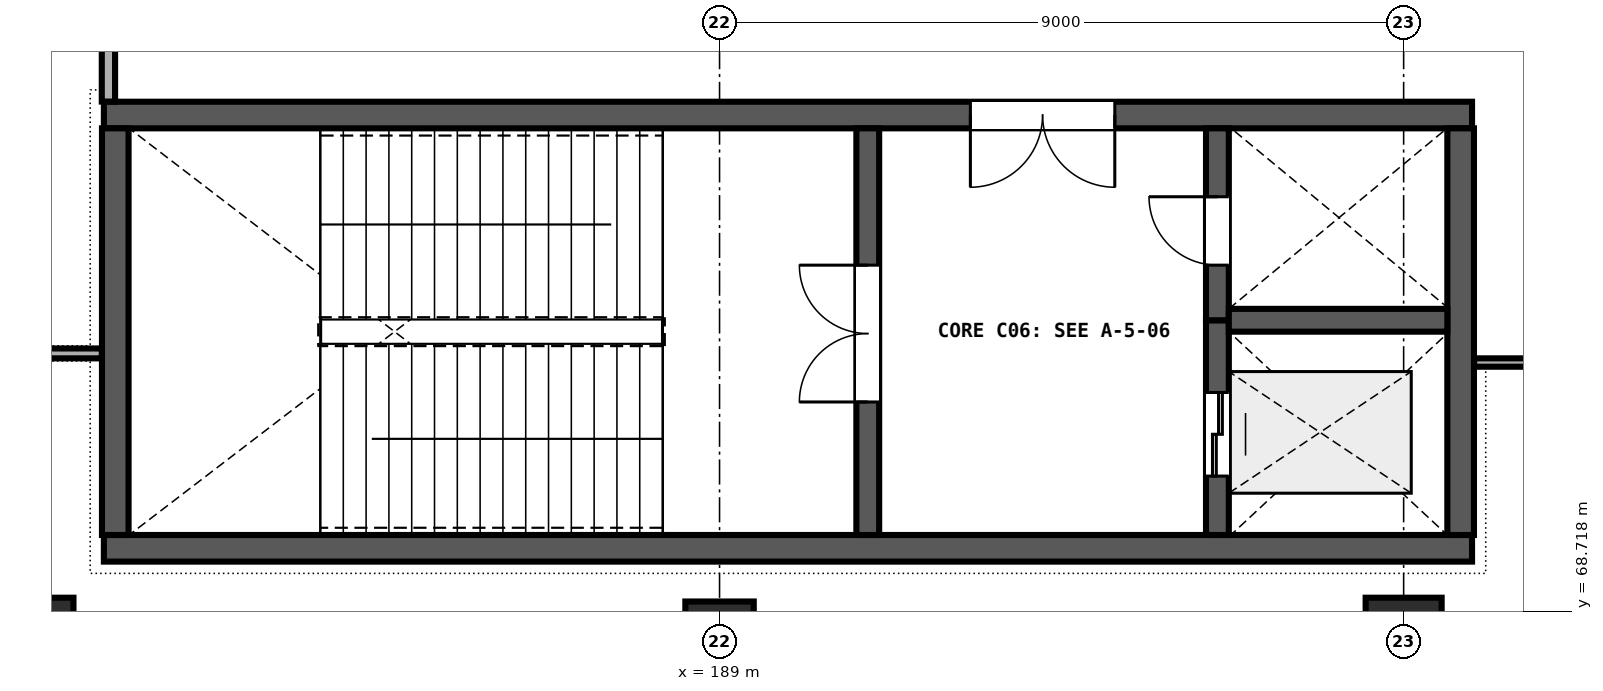
"""IFC4 building model, lengths in metres.
Left out: names, types, materials, properties, quantities, classifications, styles, units other than length and angle.
Written with IfcOpenShell. Run it as: python <this file> out.ifc"""

import sys

from ifc_helpers import new_model, si_unit, direction, frame, frame_2d, origin, origin_2d, place, context, subcontext, project, spatial, rectangle, extrude, element, fill, save


model = new_model("IFC4")
c1 = context("Model", 3, precision=1e-05, world=origin(), true_north=direction((0.0, 1.0)))
c2 = subcontext(c1, "Body", "Model", "MODEL_VIEW")
j1 = project(units=[si_unit("LENGTHUNIT", "METRE"), si_unit("PLANEANGLEUNIT", "RADIAN")], contexts=[c1])
p1 = place(None, origin())
s1 = spatial("IfcSite", under=j1, at=p1, CompositionType="ELEMENT")
p2 = place(p1, origin())
s2 = spatial("IfcBuilding", under=s1, at=p2, CompositionType="ELEMENT")
p3 = place(p2, frame((0.0, 0.0, 4.8)))
s3 = spatial("IfcBuildingStorey", under=s2, at=p3, CompositionType="ELEMENT", Elevation=4.8)
p4 = place(p3, frame((180.0, 68.4, 0.0), z_axis=(0.0, 0.0, 1.0), x_axis=(1.0, 0.0, 0.0)))
e1 = element("IfcColumn", 1, at=p4, inside=s3, PredefinedType="COLUMN", context=c2, shape_type="SweptSolid", body=[
    extrude(rectangle(XDim=1.0, YDim=1.0, at=origin_2d()), origin(), (0.0, 0.0, 1.0), 4.8),
])
p5 = place(p3, frame((189.0, 68.4, 0.0), z_axis=(0.0, 0.0, 1.0), x_axis=(1.0, 0.0, 0.0)))
e2 = element("IfcColumn", 2, at=p5, inside=s3, PredefinedType="COLUMN", context=c2, shape_type="SweptSolid", body=[
    extrude(rectangle(XDim=0.9, YDim=0.9, at=origin_2d()), origin(), (0.0, 0.0, 1.0), 4.8),
])
p6 = place(p3, frame((198.0, 68.4, 0.0), z_axis=(0.0, 0.0, 1.0), x_axis=(1.0, 0.0, 0.0)))
e3 = element("IfcColumn", 3, at=p6, inside=s3, PredefinedType="COLUMN", context=c2, shape_type="SweptSolid", body=[
    extrude(rectangle(XDim=1.0, YDim=1.0, at=origin_2d()), origin(), (0.0, 0.0, 1.0), 4.8),
])
p7 = place(p3, frame((180.9, 69.55, 0.0), z_axis=(0.0, 0.0, 1.0), x_axis=(1.0, 0.0, 0.0)))
e4 = element("IfcWall", 4, at=p7, inside=s3, PredefinedType="SHEAR", context=c2, shape_type="SweptSolid", body=[
    extrude(rectangle(XDim=18.0, YDim=0.35, at=frame_2d((9.0, 0.0))), origin(), (0.0, 0.0, 1.0), 4.52),
])
p8 = place(p3, frame((198.9, 75.25, 0.0), z_axis=(0.0, 0.0, 1.0), x_axis=(-1.0, 0.0, 0.0)))
e5 = element("IfcWall", 5, at=p8, inside=s3, PredefinedType="SHEAR", context=c2, shape_type="SweptSolid", body=[
    extrude(rectangle(XDim=18.0, YDim=0.35, at=frame_2d((9.0, 0.0))), origin(), (0.0, 0.0, 1.0), 4.52),
])
p9 = place(p8, frame((4.7, 0.0, 0.0)))
e6 = element("IfcOpeningElement", 6, at=p9, cuts=e5, PredefinedType="OPENING", context=c2, shape_type="SweptSolid", body=[
    extrude(rectangle(XDim=1.9, YDim=2.25, at=frame_2d((0.95, 1.125))), frame((0.0, 0.185, 0.0), z_axis=(0.0, -1.0, 0.0), x_axis=(1.0, 0.0, 0.0)), (0.0, 0.0, 1.0), 0.37),
])
for number, where, z_axis, x_axis in (
    (7, (181.05, 75.075, 0.0), (0.0, 0.0, 1.0), (0.0, -1.0, 0.0)),
    (8, (198.75, 69.725, 0.0), (0.0, 0.0, 1.0), (0.0, 1.0, 0.0)),
):
    element("IfcWall", number, at=place(p3, frame(where, z_axis=z_axis, x_axis=x_axis)), inside=s3, PredefinedType="SHEAR", context=c2, shape_type="SweptSolid", body=[
        extrude(rectangle(XDim=5.35, YDim=0.35, at=frame_2d((2.675, 0.0))), origin(), (0.0, 0.0, 1.0), 4.52),
    ])
p10 = place(p3, frame((190.95, 69.725, 0.0), z_axis=(0.0, 0.0, 1.0), x_axis=(0.0, 1.0, 0.0)))
e9 = element("IfcWall", 9, at=p10, inside=s3, PredefinedType="SHEAR", context=c2, shape_type="SweptSolid", body=[
    extrude(rectangle(XDim=5.35, YDim=0.3, at=frame_2d((2.675, 0.0))), origin(), (0.0, 0.0, 1.0), 4.52),
])
p11 = place(p10, frame((1.75, 0.0, 0.0)))
e10 = element("IfcOpeningElement", 10, at=p11, cuts=e9, PredefinedType="OPENING", context=c2, shape_type="SweptSolid", body=[
    extrude(rectangle(XDim=1.8, YDim=2.25, at=frame_2d((0.9, 1.125))), frame((0.0, 0.16, 0.0), z_axis=(0.0, -1.0, 0.0), x_axis=(1.0, 0.0, 0.0)), (0.0, 0.0, 1.0), 0.32),
])
p12 = place(p3, frame((195.55, 69.725, 0.0), z_axis=(0.0, 0.0, 1.0), x_axis=(0.0, 1.0, 0.0)))
e11 = element("IfcWall", 11, at=p12, inside=s3, PredefinedType="SHEAR", context=c2, shape_type="SweptSolid", body=[
    extrude(rectangle(XDim=2.825, YDim=0.3, at=frame_2d((1.413, 0.0))), origin(), (0.0, 0.0, 1.0), 4.52),
])
p13 = place(p12, frame((0.775, 0.0, 0.0)))
e12 = element("IfcOpeningElement", 12, at=p13, cuts=e11, PredefinedType="OPENING", context=c2, shape_type="SweptSolid", body=[
    extrude(rectangle(XDim=1.1, YDim=2.1, at=frame_2d((0.55, 1.05))), frame((0.0, 0.16, 0.0), z_axis=(0.0, -1.0, 0.0), x_axis=(1.0, 0.0, 0.0)), (0.0, 0.0, 1.0), 0.32),
])
p14 = place(p3, frame((195.55, 72.55, 0.0), z_axis=(0.0, 0.0, 1.0), x_axis=(0.0, 1.0, 0.0)))
e13 = element("IfcWall", 13, at=p14, inside=s3, PredefinedType="SHEAR", context=c2, shape_type="SweptSolid", body=[
    extrude(rectangle(XDim=2.525, YDim=0.3, at=frame_2d((1.262, 0.0))), origin(), (0.0, 0.0, 1.0), 4.52),
])
p15 = place(p14, frame((0.725, 0.0, 0.0)))
e14 = element("IfcOpeningElement", 14, at=p15, cuts=e13, PredefinedType="OPENING", context=c2, shape_type="SweptSolid", body=[
    extrude(rectangle(XDim=0.9, YDim=2.1, at=frame_2d((0.45, 1.05))), frame((0.0, 0.16, 0.0), z_axis=(0.0, -1.0, 0.0), x_axis=(1.0, 0.0, 0.0)), (0.0, 0.0, 1.0), 0.32),
])
p16 = place(p3, frame((195.7, 72.55, 0.0), z_axis=(0.0, 0.0, 1.0), x_axis=(1.0, 0.0, 0.0)))
e15 = element("IfcWall", 15, at=p16, inside=s3, PredefinedType="SHEAR", context=c2, shape_type="SweptSolid", body=[
    extrude(rectangle(XDim=2.875, YDim=0.3, at=frame_2d((1.438, 0.0))), origin(), (0.0, 0.0, 1.0), 4.52),
])
p17 = place(p3, frame((178.62, 72.114, 0.0), z_axis=(0.0, 0.0, 1.0), x_axis=(1.0, 0.0, 0.0)))
e16 = element("IfcWall", 16, at=p17, inside=s3, PredefinedType="PARTITIONING", context=c2, shape_type="SweptSolid", body=[
    extrude(rectangle(XDim=2.253, YDim=0.13, at=frame_2d((1.126, 0.0))), origin(), (0.0, 0.0, 1.0), 3.28),
])
p18 = place(p3, frame((198.927, 71.994, 0.0), z_axis=(0.0, 0.0, 1.0), x_axis=(1.0, 0.0, 0.0)))
e17 = element("IfcWall", 17, at=p18, inside=s3, PredefinedType="PARTITIONING", context=c2, shape_type="SweptSolid", body=[
    extrude(rectangle(XDim=2.013, YDim=0.11, at=frame_2d((1.006, 0.0))), origin(), (0.0, 0.0, 1.0), 3.28),
])
p19 = place(p3, frame((180.96, 78.33, 0.0), z_axis=(0.0, 0.0, 1.0), x_axis=(0.0, -1.0, 0.0)))
e18 = element("IfcWall", 18, at=p19, inside=s3, PredefinedType="PARTITIONING", context=c2, shape_type="SweptSolid", body=[
    extrude(rectangle(XDim=2.903, YDim=0.175, at=frame_2d((1.452, 0.0))), origin(), (0.0, 0.0, 1.0), 3.28),
])
p20 = place(p11, origin())
e19 = element("IfcDoor", 19, at=p20, inside=s3, OperationType="DOUBLE_DOOR_SINGLE_SWING", PredefinedType="DOOR", context=c2, shape_type="SweptSolid", body=[
    extrude(rectangle(XDim=1.8, YDim=2.25, at=frame_2d((0.9, 1.125))), frame((0.0, 0.025, 0.0), z_axis=(0.0, -1.0, 0.0), x_axis=(1.0, 0.0, 0.0)), (0.0, 0.0, 1.0), 0.05),
])
fill(e10, e19)
p21 = place(p15, origin())
e20 = element("IfcDoor", 20, at=p21, inside=s3, OperationType="SINGLE_SWING_RIGHT", PredefinedType="DOOR", context=c2, shape_type="SweptSolid", body=[
    extrude(rectangle(XDim=0.9, YDim=2.1, at=frame_2d((0.45, 1.05))), frame((0.0, 0.025, 0.0), z_axis=(0.0, -1.0, 0.0), x_axis=(1.0, 0.0, 0.0)), (0.0, 0.0, 1.0), 0.05),
])
fill(e14, e20)
p22 = place(p13, origin())
e21 = element("IfcDoor", 21, at=p22, inside=s3, OperationType="DOUBLE_DOOR_SLIDING", PredefinedType="DOOR", context=c2, shape_type="SweptSolid", body=[
    extrude(rectangle(XDim=1.1, YDim=2.1, at=frame_2d((0.55, 1.05))), frame((0.0, 0.025, 0.0), z_axis=(0.0, -1.0, 0.0), x_axis=(1.0, 0.0, 0.0)), (0.0, 0.0, 1.0), 0.05),
])
fill(e12, e21)
p23 = place(p9, origin())
e22 = element("IfcDoor", 22, at=p23, inside=s3, OperationType="DOUBLE_DOOR_SINGLE_SWING", PredefinedType="DOOR", context=c2, shape_type="SweptSolid", body=[
    extrude(rectangle(XDim=1.9, YDim=2.25, at=frame_2d((0.95, 1.125))), frame((0.0, 0.025, 0.0), z_axis=(0.0, -1.0, 0.0), x_axis=(1.0, 0.0, 0.0)), (0.0, 0.0, 1.0), 0.05),
])
fill(e6, e22)
save(model, sys.argv[1])
